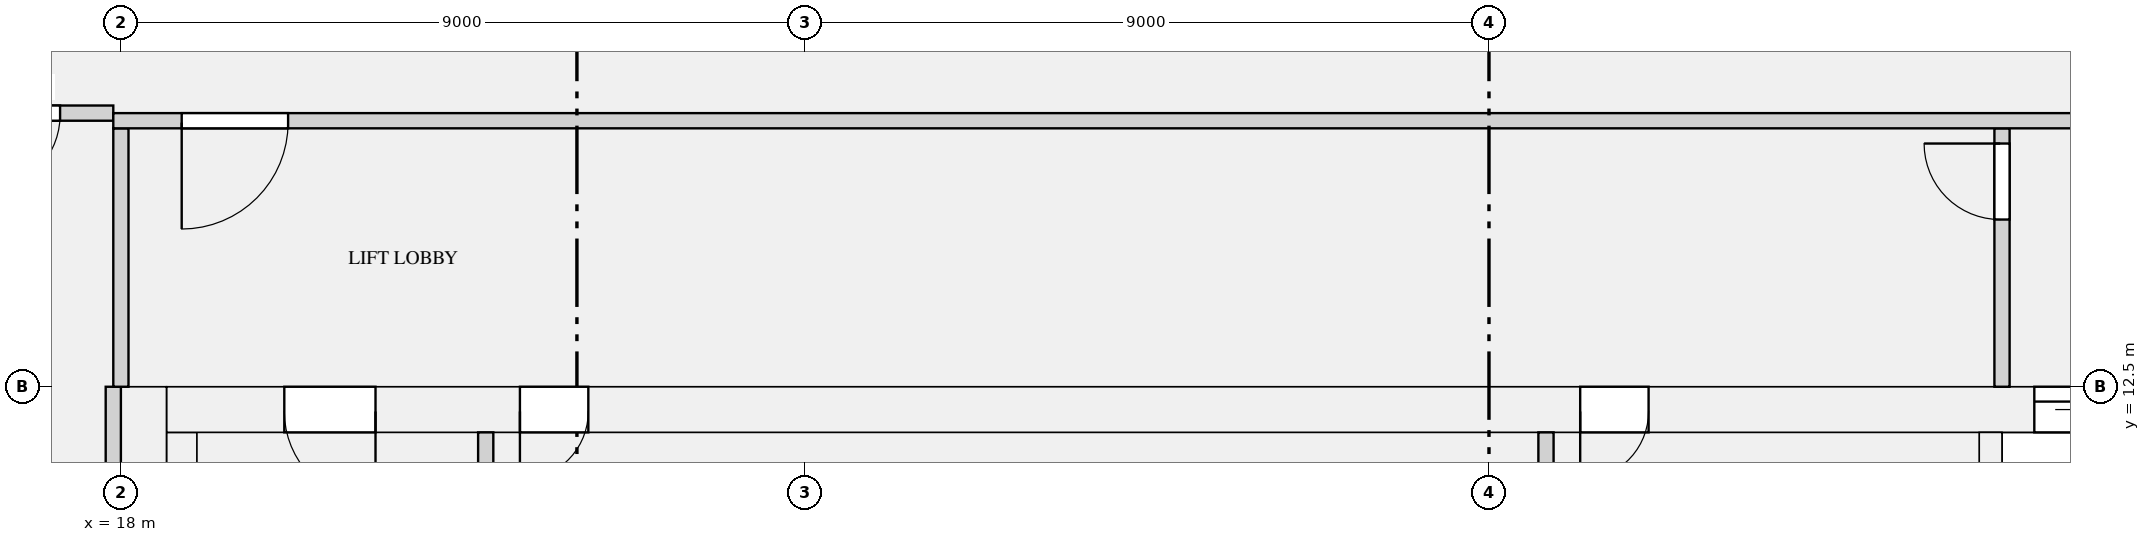
"""IFC4 building model, lengths in metres.
Left out: names, types, materials, properties, quantities, classifications, styles, units other than length and angle.
Written with IfcOpenShell. Run it as: python <this file> out.ifc"""

import sys

from ifc_helpers import new_model, si_unit, direction, frame, frame_2d, origin, place, context, subcontext, project, spatial, rectangle, extrude, element, fill, save


model = new_model("IFC4")
c1 = context("Model", 3, precision=1e-05, world=origin(), true_north=direction((0.0, 1.0)))
c2 = subcontext(c1, "Body", "Model", "MODEL_VIEW")
j1 = project(units=[si_unit("LENGTHUNIT", "METRE"), si_unit("PLANEANGLEUNIT", "RADIAN")], contexts=[c1])
p1 = place(None, origin())
s1 = spatial("IfcSite", under=j1, at=p1, CompositionType="ELEMENT")
p2 = place(p1, origin())
s2 = spatial("IfcBuilding", under=s1, at=p2, CompositionType="ELEMENT")
p3 = place(p2, frame((0.0, 0.0, 240.0)))
s3 = spatial("IfcBuildingStorey", under=s2, at=p3, CompositionType="ELEMENT", Elevation=240.0)
p4 = place(p3, frame((18.3, 0.0, 0.0), z_axis=(0.0, 0.0, 1.0), x_axis=(0.0, 1.0, 0.0)))
e1 = element("IfcWall", 1, at=p4, inside=s3, PredefinedType="SHEAR", context=c2, shape_type="SweptSolid", body=[
    extrude(rectangle(XDim=12.5, YDim=0.6, at=frame_2d((6.25, 0.0))), origin(), (0.0, 0.0, 1.0), 4.2),
])
p5 = place(p3, frame((18.6, 12.2, 0.0), z_axis=(0.0, 0.0, 1.0), x_axis=(1.0, 0.0, 0.0)))
e2 = element("IfcWall", 2, at=p5, inside=s3, PredefinedType="SHEAR", context=c2, shape_type="SweptSolid", body=[
    extrude(rectangle(XDim=34.8, YDim=0.6, at=frame_2d((17.4, 0.0))), origin(), (0.0, 0.0, 1.0), 4.2),
])
p6 = place(p5, frame((24.575, 0.0, 0.0)))
e3 = element("IfcOpeningElement", 3, at=p6, cuts=e2, PredefinedType="OPENING", context=c2, shape_type="SweptSolid", body=[
    extrude(rectangle(XDim=1.1, YDim=2.1, at=frame_2d((0.55, 1.05))), frame((0.0, 0.31, 0.0), z_axis=(0.0, -1.0, 0.0), x_axis=(1.0, 0.0, 0.0)), (0.0, 0.0, 1.0), 0.62),
])
p7 = place(p5, frame((26.825, 0.0, 0.0)))
e4 = element("IfcOpeningElement", 4, at=p7, cuts=e2, PredefinedType="OPENING", context=c2, shape_type="SweptSolid", body=[
    extrude(rectangle(XDim=1.1, YDim=2.1, at=frame_2d((0.55, 1.05))), frame((0.0, 0.31, 0.0), z_axis=(0.0, -1.0, 0.0), x_axis=(1.0, 0.0, 0.0)), (0.0, 0.0, 1.0), 0.62),
])
p8 = place(p5, frame((29.075, 0.0, 0.0)))
e5 = element("IfcOpeningElement", 5, at=p8, cuts=e2, PredefinedType="OPENING", context=c2, shape_type="SweptSolid", body=[
    extrude(rectangle(XDim=1.1, YDim=2.1, at=frame_2d((0.55, 1.05))), frame((0.0, 0.31, 0.0), z_axis=(0.0, -1.0, 0.0), x_axis=(1.0, 0.0, 0.0)), (0.0, 0.0, 1.0), 0.62),
])
p9 = place(p5, frame((18.6, 0.0, 0.0)))
e6 = element("IfcOpeningElement", 6, at=p9, cuts=e2, PredefinedType="OPENING", context=c2, shape_type="SweptSolid", body=[
    extrude(rectangle(XDim=0.9, YDim=2.1, at=frame_2d((0.45, 1.05))), frame((0.0, 0.31, 0.0), z_axis=(0.0, -1.0, 0.0), x_axis=(1.0, 0.0, 0.0)), (0.0, 0.0, 1.0), 0.62),
])
p10 = place(p5, frame((4.65, 0.0, 0.0)))
e7 = element("IfcOpeningElement", 7, at=p10, cuts=e2, PredefinedType="OPENING", context=c2, shape_type="SweptSolid", body=[
    extrude(rectangle(XDim=0.9, YDim=2.1, at=frame_2d((0.45, 1.05))), frame((0.0, 0.31, 0.0), z_axis=(0.0, -1.0, 0.0), x_axis=(1.0, 0.0, 0.0)), (0.0, 0.0, 1.0), 0.62),
])
p11 = place(p5, frame((1.55, 0.0, 0.0)))
e8 = element("IfcOpeningElement", 8, at=p11, cuts=e2, PredefinedType="OPENING", context=c2, shape_type="SweptSolid", body=[
    extrude(rectangle(XDim=1.2, YDim=2.1, at=frame_2d((0.6, 1.05))), frame((0.0, 0.31, 0.0), z_axis=(0.0, -1.0, 0.0), x_axis=(1.0, 0.0, 0.0)), (0.0, 0.0, 1.0), 0.62),
])
p12 = place(p5, frame((32.05, 0.0, 0.0)))
e9 = element("IfcOpeningElement", 9, at=p12, cuts=e2, PredefinedType="OPENING", context=c2, shape_type="SweptSolid", body=[
    extrude(rectangle(XDim=1.2, YDim=2.1, at=frame_2d((0.6, 1.05))), frame((0.0, 0.31, 0.0), z_axis=(0.0, -1.0, 0.0), x_axis=(1.0, 0.0, 0.0)), (0.0, 0.0, 1.0), 0.62),
])
p13 = place(p3, frame((18.8, 1.0, 0.0), z_axis=(0.0, 0.0, 1.0), x_axis=(0.0, 1.0, 0.0)))
e10 = element("IfcWall", 10, at=p13, inside=s3, PredefinedType="SHEAR", context=c2, shape_type="SweptSolid", body=[
    extrude(rectangle(XDim=10.9, YDim=0.4, at=frame_2d((5.45, 0.0))), origin(), (0.0, 0.0, 1.0), 4.2),
])
p14 = place(p3, frame((42.6, 8.25, 0.0), z_axis=(0.0, 0.0, 1.0), x_axis=(0.0, 1.0, 0.0)))
e11 = element("IfcWall", 11, at=p14, inside=s3, PredefinedType="SHEAR", context=c2, shape_type="SweptSolid", body=[
    extrude(rectangle(XDim=3.65, YDim=0.3, at=frame_2d((1.825, 0.0))), origin(), (0.0, 0.0, 1.0), 4.2),
])
for number, where, z_axis, x_axis in (
    (12, (22.8, 9.75, 0.0), (0.0, 0.0, 1.0), (0.0, 1.0, 0.0)),
    (13, (36.75, 9.75, 0.0), (0.0, 0.0, 1.0), (0.0, 1.0, 0.0)),
):
    element("IfcWall", number, at=place(p3, frame(where, z_axis=z_axis, x_axis=x_axis)), inside=s3, PredefinedType="PARTITIONING", context=c2, shape_type="SweptSolid", body=[
        extrude(rectangle(XDim=2.15, YDim=0.2, at=frame_2d((1.075, 0.0))), origin(), (0.0, 0.0, 1.0), 3.85),
    ])
p15 = place(p3, frame((18.0, 12.5, 0.0), z_axis=(0.0, 0.0, 1.0), x_axis=(0.0, 1.0, 0.0)))
e14 = element("IfcWall", 14, at=p15, inside=s3, PredefinedType="PARTITIONING", context=c2, shape_type="SweptSolid", body=[
    extrude(rectangle(XDim=3.4, YDim=0.2, at=frame_2d((1.7, 0.0))), origin(), (0.0, 0.0, 1.0), 3.85),
])
p16 = place(p3, frame((42.75, 12.5, 0.0), z_axis=(0.0, 0.0, 1.0), x_axis=(0.0, 1.0, 0.0)))
e15 = element("IfcWall", 15, at=p16, inside=s3, PredefinedType="PARTITIONING", context=c2, shape_type="SweptSolid", body=[
    extrude(rectangle(XDim=3.4, YDim=0.2, at=frame_2d((1.7, 0.0))), origin(), (0.0, 0.0, 1.0), 3.85),
])
p17 = place(p16, frame((2.2, 0.0, 0.0)))
e16 = element("IfcOpeningElement", 16, at=p17, cuts=e15, PredefinedType="OPENING", context=c2, shape_type="SweptSolid", body=[
    extrude(rectangle(XDim=1.0, YDim=2.1, at=frame_2d((0.5, 1.05))), frame((0.0, 0.11, 0.0), z_axis=(0.0, -1.0, 0.0), x_axis=(1.0, 0.0, 0.0)), (0.0, 0.0, 1.0), 0.22),
])
p18 = place(p3, frame((17.9, 16.0, 0.0), z_axis=(0.0, 0.0, 1.0), x_axis=(1.0, 0.0, 0.0)))
e17 = element("IfcWall", 17, at=p18, inside=s3, PredefinedType="PARTITIONING", context=c2, shape_type="SweptSolid", body=[
    extrude(rectangle(XDim=36.2, YDim=0.2, at=frame_2d((18.1, 0.0))), origin(), (0.0, 0.0, 1.0), 3.85),
])
p19 = place(p18, frame((0.9, 0.0, 0.0)))
e18 = element("IfcOpeningElement", 18, at=p19, cuts=e17, PredefinedType="OPENING", context=c2, shape_type="SweptSolid", body=[
    extrude(rectangle(XDim=1.4, YDim=2.1, at=frame_2d((0.7, 1.05))), frame((0.0, 0.11, 0.0), z_axis=(0.0, -1.0, 0.0), x_axis=(1.0, 0.0, 0.0)), (0.0, 0.0, 1.0), 0.22),
])
p20 = place(p18, frame((33.9, 0.0, 0.0)))
e19 = element("IfcOpeningElement", 19, at=p20, cuts=e17, PredefinedType="OPENING", context=c2, shape_type="SweptSolid", body=[
    extrude(rectangle(XDim=1.4, YDim=2.1, at=frame_2d((0.7, 1.05))), frame((0.0, 0.11, 0.0), z_axis=(0.0, -1.0, 0.0), x_axis=(1.0, 0.0, 0.0)), (0.0, 0.0, 1.0), 0.22),
])
p21 = place(p3, frame((11.95, 16.1, 0.0), z_axis=(0.0, 0.0, 1.0), x_axis=(1.0, 0.0, 0.0)))
e20 = element("IfcWall", 20, at=p21, inside=s3, PredefinedType="PARTITIONING", context=c2, shape_type="SweptSolid", body=[
    extrude(rectangle(XDim=5.95, YDim=0.2, at=frame_2d((2.975, 0.0))), origin(), (0.0, 0.0, 1.0), 3.85),
])
p22 = place(p21, frame((0.975, 0.0, 0.0)))
e21 = element("IfcOpeningElement", 21, at=p22, cuts=e20, PredefinedType="OPENING", context=c2, shape_type="SweptSolid", body=[
    extrude(rectangle(XDim=1.8, YDim=2.1, at=frame_2d((0.9, 1.05))), frame((0.0, 0.11, 0.0), z_axis=(0.0, -1.0, 0.0), x_axis=(1.0, 0.0, 0.0)), (0.0, 0.0, 1.0), 0.22),
])
p23 = place(p21, frame((4.25, 0.0, 0.0)))
e22 = element("IfcOpeningElement", 22, at=p23, cuts=e20, PredefinedType="OPENING", context=c2, shape_type="SweptSolid", body=[
    extrude(rectangle(XDim=1.0, YDim=2.1, at=frame_2d((0.5, 1.05))), frame((0.0, 0.11, 0.0), z_axis=(0.0, -1.0, 0.0), x_axis=(1.0, 0.0, 0.0)), (0.0, 0.0, 1.0), 0.22),
])
p24 = place(p3, frame((17.9, 0.65, 0.0), z_axis=(0.0, 0.0, 1.0), x_axis=(0.0, 1.0, 0.0)))
e23 = element("IfcWall", 23, at=p24, inside=s3, PredefinedType="PARTITIONING", context=c2, shape_type="SweptSolid", body=[
    extrude(rectangle(XDim=11.85, YDim=0.2, at=frame_2d((5.925, 0.0))), origin(), (0.0, 0.0, 1.0), 3.85),
])
p25 = place(p6, origin())
e24 = element("IfcDoor", 24, at=p25, inside=s3, OperationType="DOUBLE_DOOR_SLIDING", PredefinedType="DOOR", context=c2, shape_type="SweptSolid", body=[
    extrude(rectangle(XDim=1.1, YDim=2.1, at=frame_2d((0.55, 1.05))), frame((0.0, 0.025, 0.0), z_axis=(0.0, -1.0, 0.0), x_axis=(1.0, 0.0, 0.0)), (0.0, 0.0, 1.0), 0.05),
])
fill(e3, e24)
p26 = place(p9, frame((0.9, 0.0, 0.0), z_axis=(0.0, 0.0, 1.0), x_axis=(-1.0, 0.0, 0.0)))
e25 = element("IfcDoor", 25, at=p26, inside=s3, OperationType="SINGLE_SWING_RIGHT", PredefinedType="DOOR", context=c2, shape_type="SweptSolid", body=[
    extrude(rectangle(XDim=0.9, YDim=2.1, at=frame_2d((0.45, 1.05))), frame((0.0, 0.025, 0.0), z_axis=(0.0, -1.0, 0.0), x_axis=(1.0, 0.0, 0.0)), (0.0, 0.0, 1.0), 0.05),
])
fill(e6, e25)
p27 = place(p10, frame((0.9, 0.0, 0.0), z_axis=(0.0, 0.0, 1.0), x_axis=(-1.0, 0.0, 0.0)))
e26 = element("IfcDoor", 26, at=p27, inside=s3, OperationType="SINGLE_SWING_RIGHT", PredefinedType="DOOR", context=c2, shape_type="SweptSolid", body=[
    extrude(rectangle(XDim=0.9, YDim=2.1, at=frame_2d((0.45, 1.05))), frame((0.0, 0.025, 0.0), z_axis=(0.0, -1.0, 0.0), x_axis=(1.0, 0.0, 0.0)), (0.0, 0.0, 1.0), 0.05),
])
fill(e7, e26)
p28 = place(p11, frame((1.2, 0.0, 0.0), z_axis=(0.0, 0.0, 1.0), x_axis=(-1.0, 0.0, 0.0)))
e27 = element("IfcDoor", 27, at=p28, inside=s3, OperationType="SINGLE_SWING_LEFT", PredefinedType="DOOR", context=c2, shape_type="SweptSolid", body=[
    extrude(rectangle(XDim=1.2, YDim=2.1, at=frame_2d((0.6, 1.05))), frame((0.0, 0.025, 0.0), z_axis=(0.0, -1.0, 0.0), x_axis=(1.0, 0.0, 0.0)), (0.0, 0.0, 1.0), 0.05),
])
fill(e8, e27)
p29 = place(p17, origin())
e28 = element("IfcDoor", 28, at=p29, inside=s3, OperationType="SINGLE_SWING_RIGHT", PredefinedType="DOOR", context=c2, shape_type="SweptSolid", body=[
    extrude(rectangle(XDim=1.0, YDim=2.1, at=frame_2d((0.5, 1.05))), frame((0.0, 0.025, 0.0), z_axis=(0.0, -1.0, 0.0), x_axis=(1.0, 0.0, 0.0)), (0.0, 0.0, 1.0), 0.05),
])
fill(e16, e28)
p30 = place(p19, frame((1.4, 0.0, 0.0), z_axis=(0.0, 0.0, 1.0), x_axis=(-1.0, 0.0, 0.0)))
e29 = element("IfcDoor", 29, at=p30, inside=s3, OperationType="SINGLE_SWING_RIGHT", PredefinedType="DOOR", context=c2, shape_type="SweptSolid", body=[
    extrude(rectangle(XDim=1.4, YDim=2.1, at=frame_2d((0.7, 1.05))), frame((0.0, 0.025, 0.0), z_axis=(0.0, -1.0, 0.0), x_axis=(1.0, 0.0, 0.0)), (0.0, 0.0, 1.0), 0.05),
])
fill(e18, e29)
p31 = place(p23, frame((1.0, 0.0, 0.0), z_axis=(0.0, 0.0, 1.0), x_axis=(-1.0, 0.0, 0.0)))
e30 = element("IfcDoor", 30, at=p31, inside=s3, OperationType="SINGLE_SWING_RIGHT", PredefinedType="DOOR", context=c2, shape_type="SweptSolid", body=[
    extrude(rectangle(XDim=1.0, YDim=2.1, at=frame_2d((0.5, 1.05))), frame((0.0, 0.025, 0.0), z_axis=(0.0, -1.0, 0.0), x_axis=(1.0, 0.0, 0.0)), (0.0, 0.0, 1.0), 0.05),
])
fill(e22, e30)
save(model, sys.argv[1])
